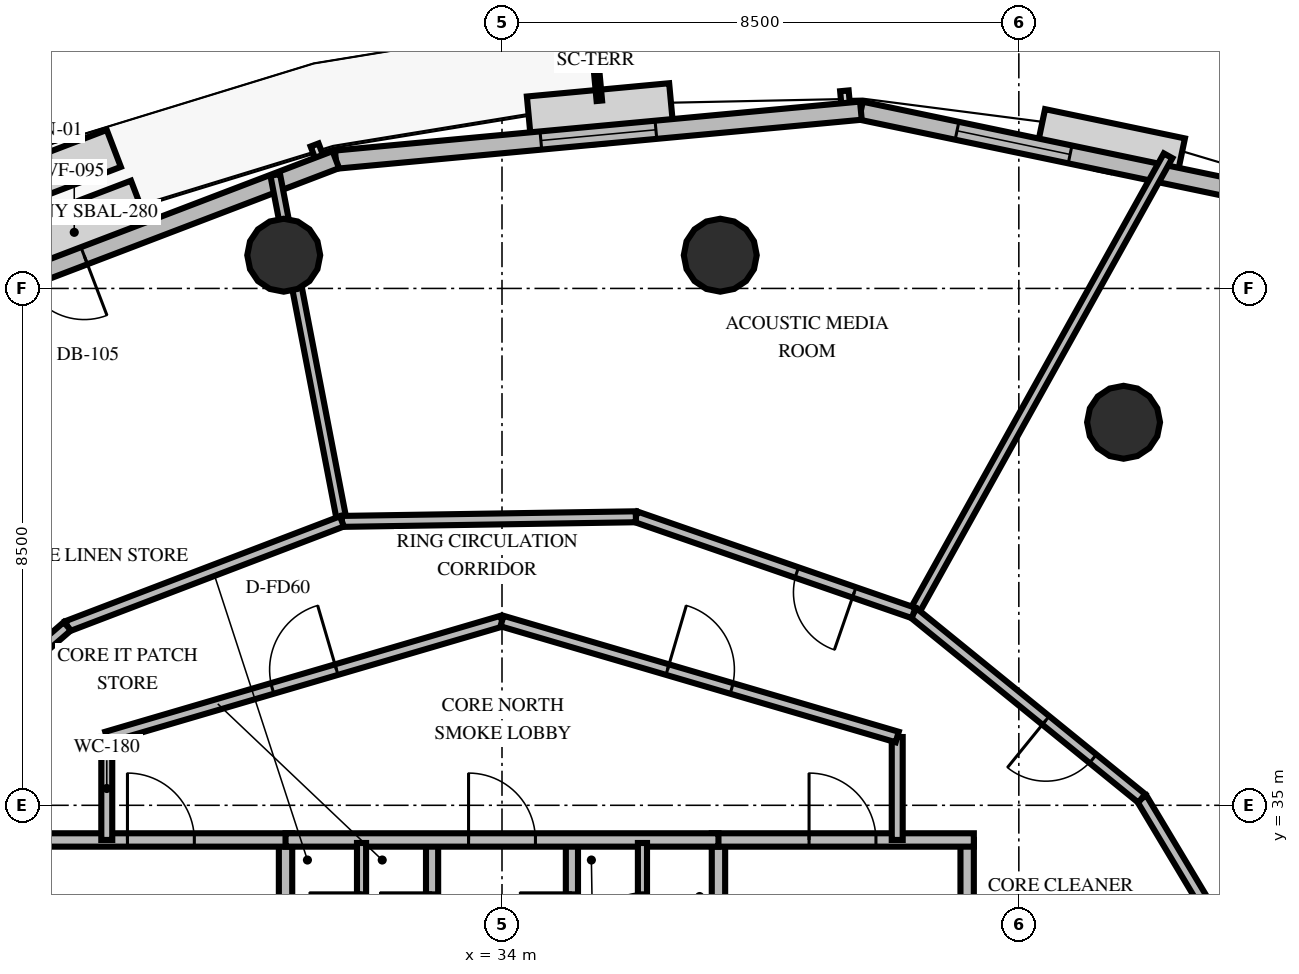
"""IFC4 building model, lengths in metres.
Left out: names, types, materials, properties, quantities, classifications, styles, units other than length and angle.
Written with IfcOpenShell. Run it as: python <this file> out.ifc"""

import sys

from ifc_helpers import new_model, si_unit, direction, frame, frame_2d, origin, origin_2d, place, context, subcontext, project, spatial, rectangle, circle, extrude, element, fill, save


model = new_model("IFC4")
c1 = context("Model", 3, precision=1e-05, world=origin(), true_north=direction((0.0, 1.0)))
c2 = subcontext(c1, "Body", "Model", "MODEL_VIEW")
j1 = project(units=[si_unit("LENGTHUNIT", "METRE"), si_unit("PLANEANGLEUNIT", "RADIAN")], contexts=[c1])
p1 = place(None, origin())
s1 = spatial("IfcSite", under=j1, at=p1, CompositionType="ELEMENT")
p2 = place(p1, origin())
s2 = spatial("IfcBuilding", under=s1, at=p2, CompositionType="ELEMENT")
p3 = place(p2, frame((0.0, 0.0, 121.8)))
s3 = spatial("IfcBuildingStorey", under=s2, at=p3, CompositionType="ELEMENT", Elevation=121.8)
for number, where, z_axis, x_axis in (
    (1, (44.222, 41.299, 0.0), (0.0, 0.0, 1.0), (1.0, 0.0, 0.0)),
    (2, (37.59, 44.046, 0.0), (0.0, 0.0, 1.0), (1.0, 0.0, 0.0)),
    (3, (30.41, 44.046, 0.0), (0.0, 0.0, 1.0), (1.0, 0.0, 0.0)),
):
    element("IfcColumn", number, at=place(p3, frame(where, z_axis=z_axis, x_axis=x_axis)), inside=s3, PredefinedType="COLUMN", context=c2, shape_type="SweptSolid", body=[
        extrude(circle(Radius=0.6, at=origin_2d()), origin(), (0.0, 0.0, 1.0), 4.0),
    ])
p4 = place(p3, frame((47.826, 44.766, 0.0), z_axis=(0.0, 0.0, 1.0), x_axis=(-0.978800890802, 0.20481410148, 0.0)))
e4 = element("IfcWall", 4, at=p4, inside=s3, PredefinedType="SOLIDWALL", context=c2, shape_type="SweptSolid", body=[
    extrude(rectangle(XDim=8.095, YDim=0.3, at=frame_2d((4.047, 0.0))), origin(), (0.0, 0.0, 1.0), 2.9),
])
p5 = place(p4, frame((4.58, 0.0, 0.8)))
e5 = element("IfcOpeningElement", 5, at=p5, cuts=e4, PredefinedType="OPENING", context=c2, shape_type="SweptSolid", body=[
    extrude(rectangle(XDim=1.9, YDim=1.95, at=frame_2d((0.95, 0.975))), frame((0.0, 0.16, 0.0), z_axis=(0.0, -1.0, 0.0), x_axis=(1.0, 0.0, 0.0)), (0.0, 0.0, 1.0), 0.32),
])
p6 = place(p3, frame((39.903, 46.424, 0.0), z_axis=(0.0, 0.0, 1.0), x_axis=(-0.995678666902, -0.092865452549, 0.0)))
e6 = element("IfcWall", 6, at=p6, inside=s3, PredefinedType="SOLIDWALL", context=c2, shape_type="SweptSolid", body=[
    extrude(rectangle(XDim=8.673, YDim=0.3, at=frame_2d((4.336, 0.0))), origin(), (0.0, 0.0, 1.0), 2.9),
])
p7 = place(p6, frame((3.386, 0.0, 0.8)))
e7 = element("IfcOpeningElement", 7, at=p7, cuts=e6, PredefinedType="OPENING", context=c2, shape_type="SweptSolid", body=[
    extrude(rectangle(XDim=1.9, YDim=1.95, at=frame_2d((0.95, 0.975))), frame((0.0, 0.16, 0.0), z_axis=(0.0, -1.0, 0.0), x_axis=(1.0, 0.0, 0.0)), (0.0, 0.0, 1.0), 0.32),
])
p8 = place(p3, frame((31.267, 45.618, 0.0), z_axis=(0.0, 0.0, 1.0), x_axis=(-0.934198586352, -0.356753418003, 0.0)))
e8 = element("IfcWall", 8, at=p8, inside=s3, PredefinedType="SOLIDWALL", context=c2, shape_type="SweptSolid", body=[
    extrude(rectangle(XDim=8.891, YDim=0.3, at=frame_2d((4.445, 0.0))), origin(), (0.0, 0.0, 1.0), 2.9),
])
p9 = place(p8, frame((4.43, 0.0, 0.0)))
e9 = element("IfcOpeningElement", 9, at=p9, cuts=e8, PredefinedType="OPENING", context=c2, shape_type="SweptSolid", body=[
    extrude(rectangle(XDim=1.05, YDim=2.15, at=frame_2d((0.525, 1.075))), frame((0.0, 0.16, 0.0), z_axis=(0.0, -1.0, 0.0), x_axis=(1.0, 0.0, 0.0)), (0.0, 0.0, 1.0), 0.32),
])
p10 = place(p3, frame((30.44, 30.05, 0.0), z_axis=(0.0, 0.0, 1.0), x_axis=(0.0, 1.0, 0.0)))
e10 = element("IfcWall", 10, at=p10, inside=s3, PredefinedType="SOLIDWALL", context=c2, shape_type="SweptSolid", body=[
    extrude(rectangle(XDim=4.38, YDim=0.22, at=frame_2d((2.19, 0.0))), origin(), (0.0, 0.0, 1.0), 2.8),
])
p11 = place(p10, frame((0.8, 0.0, 0.0)))
e11 = element("IfcOpeningElement", 11, at=p11, cuts=e10, PredefinedType="OPENING", context=c2, shape_type="SweptSolid", body=[
    extrude(rectangle(XDim=1.05, YDim=2.1, at=frame_2d((0.525, 1.05))), frame((0.0, 0.12, 0.0), z_axis=(0.0, -1.0, 0.0), x_axis=(1.0, 0.0, 0.0)), (0.0, 0.0, 1.0), 0.24),
])
p12 = place(p3, frame((26.24, 34.43, 0.0), z_axis=(0.0, 0.0, 1.0), x_axis=(1.0, 0.0, 0.0)))
e12 = element("IfcWall", 12, at=p12, inside=s3, PredefinedType="SOLIDWALL", context=c2, shape_type="SweptSolid", body=[
    extrude(rectangle(XDim=4.31, YDim=0.22, at=frame_2d((2.155, 0.0))), origin(), (0.0, 0.0, 1.0), 2.8),
])
p13 = place(p12, frame((1.6, 0.0, 0.0)))
e13 = element("IfcOpeningElement", 13, at=p13, cuts=e12, PredefinedType="OPENING", context=c2, shape_type="SweptSolid", body=[
    extrude(rectangle(XDim=1.1, YDim=2.15, at=frame_2d((0.55, 1.075))), frame((0.0, 0.12, 0.0), z_axis=(0.0, -1.0, 0.0), x_axis=(1.0, 0.0, 0.0)), (0.0, 0.0, 1.0), 0.24),
])
p14 = place(p3, frame((32.85, 30.05, 0.0), z_axis=(0.0, 0.0, 1.0), x_axis=(0.0, 1.0, 0.0)))
e14 = element("IfcWall", 14, at=p14, inside=s3, PredefinedType="SOLIDWALL", context=c2, shape_type="SweptSolid", body=[
    extrude(rectangle(XDim=4.38, YDim=0.2, at=frame_2d((2.19, 0.0))), origin(), (0.0, 0.0, 1.0), 2.8),
])
p15 = place(p14, frame((2.65, 0.0, 0.0)))
e15 = element("IfcOpeningElement", 15, at=p15, cuts=e14, PredefinedType="OPENING", context=c2, shape_type="SweptSolid", body=[
    extrude(rectangle(XDim=0.86, YDim=2.05, at=frame_2d((0.43, 1.025))), frame((0.0, 0.11, 0.0), z_axis=(0.0, -1.0, 0.0), x_axis=(1.0, 0.0, 0.0)), (0.0, 0.0, 1.0), 0.22),
])
p16 = place(p3, frame((37.56, 30.05, 0.0), z_axis=(0.0, 0.0, 1.0), x_axis=(0.0, 1.0, 0.0)))
e16 = element("IfcWall", 16, at=p16, inside=s3, PredefinedType="SOLIDWALL", context=c2, shape_type="SweptSolid", body=[
    extrude(rectangle(XDim=4.38, YDim=0.22, at=frame_2d((2.19, 0.0))), origin(), (0.0, 0.0, 1.0), 2.8),
])
p17 = place(p16, frame((0.8, 0.0, 0.0)))
e17 = element("IfcOpeningElement", 17, at=p17, cuts=e16, PredefinedType="OPENING", context=c2, shape_type="SweptSolid", body=[
    extrude(rectangle(XDim=1.05, YDim=2.1, at=frame_2d((0.525, 1.05))), frame((0.0, 0.12, 0.0), z_axis=(0.0, -1.0, 0.0), x_axis=(1.0, 0.0, 0.0)), (0.0, 0.0, 1.0), 0.24),
])
p18 = place(p3, frame((41.65, 30.05, 0.0), z_axis=(0.0, 0.0, 1.0), x_axis=(0.0, 1.0, 0.0)))
e18 = element("IfcWall", 18, at=p18, inside=s3, PredefinedType="SOLIDWALL", context=c2, shape_type="SweptSolid", body=[
    extrude(rectangle(XDim=4.38, YDim=0.22, at=frame_2d((2.19, 0.0))), origin(), (0.0, 0.0, 1.0), 2.8),
])
p19 = place(p3, frame((37.45, 34.43, 0.0), z_axis=(0.0, 0.0, 1.0), x_axis=(1.0, 0.0, 0.0)))
e19 = element("IfcWall", 19, at=p19, inside=s3, PredefinedType="SOLIDWALL", context=c2, shape_type="SweptSolid", body=[
    extrude(rectangle(XDim=4.31, YDim=0.22, at=frame_2d((2.155, 0.0))), origin(), (0.0, 0.0, 1.0), 2.8),
])
p20 = place(p19, frame((1.6, 0.0, 0.0)))
e20 = element("IfcOpeningElement", 20, at=p20, cuts=e19, PredefinedType="OPENING", context=c2, shape_type="SweptSolid", body=[
    extrude(rectangle(XDim=1.1, YDim=2.15, at=frame_2d((0.55, 1.075))), frame((0.0, 0.12, 0.0), z_axis=(0.0, -1.0, 0.0), x_axis=(1.0, 0.0, 0.0)), (0.0, 0.0, 1.0), 0.24),
])
p21 = place(p3, frame((35.15, 30.05, 0.0), z_axis=(0.0, 0.0, 1.0), x_axis=(0.0, 1.0, 0.0)))
e21 = element("IfcWall", 21, at=p21, inside=s3, PredefinedType="SOLIDWALL", context=c2, shape_type="SweptSolid", body=[
    extrude(rectangle(XDim=4.38, YDim=0.2, at=frame_2d((2.19, 0.0))), origin(), (0.0, 0.0, 1.0), 2.8),
])
p22 = place(p21, frame((2.65, 0.0, 0.0)))
e22 = element("IfcOpeningElement", 22, at=p22, cuts=e21, PredefinedType="OPENING", context=c2, shape_type="SweptSolid", body=[
    extrude(rectangle(XDim=0.86, YDim=2.05, at=frame_2d((0.43, 1.025))), frame((0.0, 0.11, 0.0), z_axis=(0.0, -1.0, 0.0), x_axis=(1.0, 0.0, 0.0)), (0.0, 0.0, 1.0), 0.22),
])
p23 = place(p3, frame((30.44, 34.43, 0.0), z_axis=(0.0, 0.0, 1.0), x_axis=(1.0, 0.0, 0.0)))
e23 = element("IfcWall", 23, at=p23, inside=s3, PredefinedType="SOLIDWALL", context=c2, shape_type="SweptSolid", body=[
    extrude(rectangle(XDim=7.12, YDim=0.22, at=frame_2d((3.56, 0.0))), origin(), (0.0, 0.0, 1.0), 2.8),
])
p24 = place(p23, frame((3.01, 0.0, 0.0)))
e24 = element("IfcOpeningElement", 24, at=p24, cuts=e23, PredefinedType="OPENING", context=c2, shape_type="SweptSolid", body=[
    extrude(rectangle(XDim=1.1, YDim=2.15, at=frame_2d((0.55, 1.075))), frame((0.0, 0.12, 0.0), z_axis=(0.0, -1.0, 0.0), x_axis=(1.0, 0.0, 0.0)), (0.0, 0.0, 1.0), 0.24),
])
p25 = place(p3, frame((31.69, 32.05, 0.0), z_axis=(0.0, 0.0, 1.0), x_axis=(0.0, 1.0, 0.0)))
e25 = element("IfcWall", 25, at=p25, inside=s3, PredefinedType="PARTITIONING", context=c2, shape_type="SweptSolid", body=[
    extrude(rectangle(XDim=2.33, YDim=0.15, at=frame_2d((1.165, 0.0))), origin(), (0.0, 0.0, 1.0), 2.8),
])
p26 = place(p25, frame((0.65, 0.0, 0.0)))
e26 = element("IfcOpeningElement", 26, at=p26, cuts=e25, PredefinedType="OPENING", context=c2, shape_type="SweptSolid", body=[
    extrude(rectangle(XDim=0.86, YDim=2.05, at=frame_2d((0.43, 1.025))), frame((0.0, 0.085, 0.0), z_axis=(0.0, -1.0, 0.0), x_axis=(1.0, 0.0, 0.0)), (0.0, 0.0, 1.0), 0.17),
])
p27 = place(p3, frame((36.31, 32.05, 0.0), z_axis=(0.0, 0.0, 1.0), x_axis=(0.0, 1.0, 0.0)))
e27 = element("IfcWall", 27, at=p27, inside=s3, PredefinedType="PARTITIONING", context=c2, shape_type="SweptSolid", body=[
    extrude(rectangle(XDim=2.33, YDim=0.15, at=frame_2d((1.165, 0.0))), origin(), (0.0, 0.0, 1.0), 2.8),
])
p28 = place(p27, frame((0.65, 0.0, 0.0)))
e28 = element("IfcOpeningElement", 28, at=p28, cuts=e27, PredefinedType="OPENING", context=c2, shape_type="SweptSolid", body=[
    extrude(rectangle(XDim=0.86, YDim=2.05, at=frame_2d((0.43, 1.025))), frame((0.0, 0.085, 0.0), z_axis=(0.0, -1.0, 0.0), x_axis=(1.0, 0.0, 0.0)), (0.0, 0.0, 1.0), 0.17),
])
for number, where, z_axis, x_axis in (
    (29, (27.5, 34.43, 0.0), (0.0, 0.0, 1.0), (0.0, 1.0, 0.0)),
    (30, (40.5, 36.123, 0.0), (0.0, 0.0, 1.0), (0.0, -1.0, 0.0)),
):
    element("IfcWall", number, at=place(p3, frame(where, z_axis=z_axis, x_axis=x_axis)), inside=s3, PredefinedType="PARTITIONING", context=c2, shape_type="SweptSolid", body=[
        extrude(rectangle(XDim=1.693, YDim=0.18, at=frame_2d((0.846, 0.0))), origin(), (0.0, 0.0, 1.0), 2.8),
    ])
p29 = place(p3, frame((27.5, 36.123, 0.0), z_axis=(0.0, 0.0, 1.0), x_axis=(0.959546654541, 0.281549671923, 0.0)))
e31 = element("IfcWall", 31, at=p29, inside=s3, PredefinedType="PARTITIONING", context=c2, shape_type="SweptSolid", body=[
    extrude(rectangle(XDim=6.774, YDim=0.18, at=frame_2d((3.387, 0.0))), origin(), (0.0, 0.0, 1.0), 2.8),
])
p30 = place(p29, frame((2.837, 0.0, 0.0)))
e32 = element("IfcOpeningElement", 32, at=p30, cuts=e31, PredefinedType="OPENING", context=c2, shape_type="SweptSolid", body=[
    extrude(rectangle(XDim=1.1, YDim=2.15, at=frame_2d((0.55, 1.075))), frame((0.0, 0.1, 0.0), z_axis=(0.0, -1.0, 0.0), x_axis=(1.0, 0.0, 0.0)), (0.0, 0.0, 1.0), 0.2),
])
p31 = place(p3, frame((34.0, 38.03, 0.0), z_axis=(0.0, 0.0, 1.0), x_axis=(0.959546654541, -0.281549671923, 0.0)))
e33 = element("IfcWall", 33, at=p31, inside=s3, PredefinedType="PARTITIONING", context=c2, shape_type="SweptSolid", body=[
    extrude(rectangle(XDim=6.774, YDim=0.18, at=frame_2d((3.387, 0.0))), origin(), (0.0, 0.0, 1.0), 2.8),
])
p32 = place(p31, frame((2.837, 0.0, 0.0)))
e34 = element("IfcOpeningElement", 34, at=p32, cuts=e33, PredefinedType="OPENING", context=c2, shape_type="SweptSolid", body=[
    extrude(rectangle(XDim=1.1, YDim=2.15, at=frame_2d((0.55, 1.075))), frame((0.0, 0.1, 0.0), z_axis=(0.0, -1.0, 0.0), x_axis=(1.0, 0.0, 0.0)), (0.0, 0.0, 1.0), 0.2),
])
p33 = place(p3, frame((40.77, 38.163, 0.0), z_axis=(0.0, 0.0, 1.0), x_axis=(0.486326925852, 0.873776928736, 0.0)))
e35 = element("IfcWall", 35, at=p33, inside=s3, PredefinedType="PARTITIONING", context=c2, shape_type="SweptSolid", body=[
    extrude(rectangle(XDim=8.605, YDim=0.16, at=frame_2d((4.302, 0.0))), origin(), (0.0, 0.0, 1.0), 2.8),
])
p34 = place(p3, frame((47.004, 30.966, 0.0), z_axis=(0.0, 0.0, 1.0), x_axis=(-0.513544831917, 0.858062763212, 0.0)))
e36 = element("IfcWall", 36, at=p34, inside=s3, PredefinedType="PARTITIONING", context=c2, shape_type="SweptSolid", body=[
    extrude(rectangle(XDim=4.834, YDim=0.18, at=frame_2d((2.417, 0.0))), origin(), (0.0, 0.0, 1.0), 2.8),
])
p35 = place(p3, frame((44.521, 35.114, 0.0), z_axis=(0.0, 0.0, 1.0), x_axis=(-0.776056841092, 0.630662968149, 0.0)))
e37 = element("IfcWall", 37, at=p35, inside=s3, PredefinedType="PARTITIONING", context=c2, shape_type="SweptSolid", body=[
    extrude(rectangle(XDim=4.834, YDim=0.18, at=frame_2d((2.417, 0.0))), origin(), (0.0, 0.0, 1.0), 2.8),
])
p36 = place(p35, frame((1.034, 0.0, 0.0)))
e38 = element("IfcOpeningElement", 38, at=p36, cuts=e37, PredefinedType="OPENING", context=c2, shape_type="SweptSolid", body=[
    extrude(rectangle(XDim=1.0, YDim=2.15, at=frame_2d((0.5, 1.075))), frame((0.0, 0.1, 0.0), z_axis=(0.0, -1.0, 0.0), x_axis=(1.0, 0.0, 0.0)), (0.0, 0.0, 1.0), 0.2),
])
p37 = place(p3, frame((31.368, 39.669, 0.0), z_axis=(0.0, 0.0, 1.0), x_axis=(-0.18909703684, 0.981958405768, 0.0)))
e39 = element("IfcWall", 39, at=p37, inside=s3, PredefinedType="PARTITIONING", context=c2, shape_type="SweptSolid", body=[
    extrude(rectangle(XDim=5.803, YDim=0.16, at=frame_2d((2.902, 0.0))), origin(), (0.0, 0.0, 1.0), 2.8),
])
p38 = place(p3, frame((40.77, 38.163, 0.0), z_axis=(0.0, 0.0, 1.0), x_axis=(-0.944937429252, 0.32725105775, 0.0)))
e40 = element("IfcWall", 40, at=p38, inside=s3, PredefinedType="PARTITIONING", context=c2, shape_type="SweptSolid", body=[
    extrude(rectangle(XDim=4.834, YDim=0.18, at=frame_2d((2.417, 0.0))), origin(), (0.0, 0.0, 1.0), 2.8),
])
p39 = place(p38, frame((1.034, 0.0, 0.0)))
e41 = element("IfcOpeningElement", 41, at=p39, cuts=e40, PredefinedType="OPENING", context=c2, shape_type="SweptSolid", body=[
    extrude(rectangle(XDim=1.0, YDim=2.15, at=frame_2d((0.5, 1.075))), frame((0.0, 0.1, 0.0), z_axis=(0.0, -1.0, 0.0), x_axis=(1.0, 0.0, 0.0)), (0.0, 0.0, 1.0), 0.2),
])
p40 = place(p3, frame((36.202, 39.745, 0.0), z_axis=(0.0, 0.0, 1.0), x_axis=(-0.999876654329, -0.015705926537, 0.0)))
e42 = element("IfcWall", 42, at=p40, inside=s3, PredefinedType="PARTITIONING", context=c2, shape_type="SweptSolid", body=[
    extrude(rectangle(XDim=4.834, YDim=0.18, at=frame_2d((2.417, 0.0))), origin(), (0.0, 0.0, 1.0), 2.8),
])
p41 = place(p3, frame((31.368, 39.669, 0.0), z_axis=(0.0, 0.0, 1.0), x_axis=(-0.934205840652, -0.356734421232, 0.0)))
e43 = element("IfcWall", 43, at=p41, inside=s3, PredefinedType="PARTITIONING", context=c2, shape_type="SweptSolid", body=[
    extrude(rectangle(XDim=4.834, YDim=0.18, at=frame_2d((2.417, 0.0))), origin(), (0.0, 0.0, 1.0), 2.8),
])
p42 = place(p3, frame((26.852, 37.944, 0.0), z_axis=(0.0, 0.0, 1.0), x_axis=(-0.755849022926, -0.654745946564, 0.0)))
e44 = element("IfcWall", 44, at=p42, inside=s3, PredefinedType="PARTITIONING", context=c2, shape_type="SweptSolid", body=[
    extrude(rectangle(XDim=4.834, YDim=0.18, at=frame_2d((2.417, 0.0))), origin(), (0.0, 0.0, 1.0), 2.8),
])
p43 = place(p42, frame((2.801, 0.0, 0.0)))
e45 = element("IfcOpeningElement", 45, at=p43, cuts=e44, PredefinedType="OPENING", context=c2, shape_type="SweptSolid", body=[
    extrude(rectangle(XDim=1.0, YDim=2.15, at=frame_2d((0.5, 1.075))), frame((0.0, 0.1, 0.0), z_axis=(0.0, -1.0, 0.0), x_axis=(1.0, 0.0, 0.0)), (0.0, 0.0, 1.0), 0.2),
])
p44 = place(p5, origin())
e46 = element("IfcWindow", 46, at=p44, inside=s3, PartitioningType="SINGLE_PANEL", PredefinedType="WINDOW", context=c2, shape_type="SweptSolid", body=[
    extrude(rectangle(XDim=1.9, YDim=1.95, at=frame_2d((0.95, 0.975))), frame((0.0, 0.03, 0.0), z_axis=(0.0, -1.0, 0.0), x_axis=(1.0, 0.0, 0.0)), (0.0, 0.0, 1.0), 0.06),
])
fill(e5, e46)
p45 = place(p7, origin())
e47 = element("IfcWindow", 47, at=p45, inside=s3, PartitioningType="SINGLE_PANEL", PredefinedType="WINDOW", context=c2, shape_type="SweptSolid", body=[
    extrude(rectangle(XDim=1.9, YDim=1.95, at=frame_2d((0.95, 0.975))), frame((0.0, 0.03, 0.0), z_axis=(0.0, -1.0, 0.0), x_axis=(1.0, 0.0, 0.0)), (0.0, 0.0, 1.0), 0.06),
])
fill(e7, e47)
p46 = place(p9, origin())
e48 = element("IfcDoor", 48, at=p46, inside=s3, OperationType="SINGLE_SWING_LEFT", PredefinedType="DOOR", context=c2, shape_type="SweptSolid", body=[
    extrude(rectangle(XDim=1.05, YDim=2.15, at=frame_2d((0.525, 1.075))), frame((0.0, 0.025, 0.0), z_axis=(0.0, -1.0, 0.0), x_axis=(1.0, 0.0, 0.0)), (0.0, 0.0, 1.0), 0.05),
])
fill(e9, e48)
p47 = place(p13, origin())
e49 = element("IfcDoor", 49, at=p47, inside=s3, OperationType="SINGLE_SWING_LEFT", PredefinedType="DOOR", context=c2, shape_type="SweptSolid", body=[
    extrude(rectangle(XDim=1.1, YDim=2.15, at=frame_2d((0.55, 1.075))), frame((0.0, 0.025, 0.0), z_axis=(0.0, -1.0, 0.0), x_axis=(1.0, 0.0, 0.0)), (0.0, 0.0, 1.0), 0.05),
])
fill(e13, e49)
p48 = place(p15, origin())
e50 = element("IfcDoor", 50, at=p48, inside=s3, OperationType="SINGLE_SWING_RIGHT", PredefinedType="TRAPDOOR", context=c2, shape_type="SweptSolid", body=[
    extrude(rectangle(XDim=0.86, YDim=2.05, at=frame_2d((0.43, 1.025))), frame((0.0, 0.025, 0.0), z_axis=(0.0, -1.0, 0.0), x_axis=(1.0, 0.0, 0.0)), (0.0, 0.0, 1.0), 0.05),
])
fill(e15, e50)
p49 = place(p20, origin())
e51 = element("IfcDoor", 51, at=p49, inside=s3, OperationType="SINGLE_SWING_LEFT", PredefinedType="DOOR", context=c2, shape_type="SweptSolid", body=[
    extrude(rectangle(XDim=1.1, YDim=2.15, at=frame_2d((0.55, 1.075))), frame((0.0, 0.025, 0.0), z_axis=(0.0, -1.0, 0.0), x_axis=(1.0, 0.0, 0.0)), (0.0, 0.0, 1.0), 0.05),
])
fill(e20, e51)
p50 = place(p22, origin())
e52 = element("IfcDoor", 52, at=p50, inside=s3, OperationType="SINGLE_SWING_RIGHT", PredefinedType="TRAPDOOR", context=c2, shape_type="SweptSolid", body=[
    extrude(rectangle(XDim=0.86, YDim=2.05, at=frame_2d((0.43, 1.025))), frame((0.0, 0.025, 0.0), z_axis=(0.0, -1.0, 0.0), x_axis=(1.0, 0.0, 0.0)), (0.0, 0.0, 1.0), 0.05),
])
fill(e22, e52)
p51 = place(p24, origin())
e53 = element("IfcDoor", 53, at=p51, inside=s3, OperationType="SINGLE_SWING_LEFT", PredefinedType="DOOR", context=c2, shape_type="SweptSolid", body=[
    extrude(rectangle(XDim=1.1, YDim=2.15, at=frame_2d((0.55, 1.075))), frame((0.0, 0.025, 0.0), z_axis=(0.0, -1.0, 0.0), x_axis=(1.0, 0.0, 0.0)), (0.0, 0.0, 1.0), 0.05),
])
fill(e24, e53)
p52 = place(p26, origin())
e54 = element("IfcDoor", 54, at=p52, inside=s3, OperationType="SINGLE_SWING_RIGHT", PredefinedType="TRAPDOOR", context=c2, shape_type="SweptSolid", body=[
    extrude(rectangle(XDim=0.86, YDim=2.05, at=frame_2d((0.43, 1.025))), frame((0.0, 0.025, 0.0), z_axis=(0.0, -1.0, 0.0), x_axis=(1.0, 0.0, 0.0)), (0.0, 0.0, 1.0), 0.05),
])
fill(e26, e54)
p53 = place(p28, origin())
e55 = element("IfcDoor", 55, at=p53, inside=s3, OperationType="SINGLE_SWING_LEFT", PredefinedType="TRAPDOOR", context=c2, shape_type="SweptSolid", body=[
    extrude(rectangle(XDim=0.86, YDim=2.05, at=frame_2d((0.43, 1.025))), frame((0.0, 0.025, 0.0), z_axis=(0.0, -1.0, 0.0), x_axis=(1.0, 0.0, 0.0)), (0.0, 0.0, 1.0), 0.05),
])
fill(e28, e55)
p54 = place(p30, origin())
e56 = element("IfcDoor", 56, at=p54, inside=s3, OperationType="SINGLE_SWING_RIGHT", PredefinedType="DOOR", context=c2, shape_type="SweptSolid", body=[
    extrude(rectangle(XDim=1.1, YDim=2.15, at=frame_2d((0.55, 1.075))), frame((0.0, 0.025, 0.0), z_axis=(0.0, -1.0, 0.0), x_axis=(1.0, 0.0, 0.0)), (0.0, 0.0, 1.0), 0.05),
])
fill(e32, e56)
p55 = place(p32, origin())
e57 = element("IfcDoor", 57, at=p55, inside=s3, OperationType="SINGLE_SWING_LEFT", PredefinedType="DOOR", context=c2, shape_type="SweptSolid", body=[
    extrude(rectangle(XDim=1.1, YDim=2.15, at=frame_2d((0.55, 1.075))), frame((0.0, 0.025, 0.0), z_axis=(0.0, -1.0, 0.0), x_axis=(1.0, 0.0, 0.0)), (0.0, 0.0, 1.0), 0.05),
])
fill(e34, e57)
p56 = place(p36, origin())
e58 = element("IfcDoor", 58, at=p56, inside=s3, OperationType="SINGLE_SWING_RIGHT", PredefinedType="DOOR", context=c2, shape_type="SweptSolid", body=[
    extrude(rectangle(XDim=1.0, YDim=2.15, at=frame_2d((0.5, 1.075))), frame((0.0, 0.025, 0.0), z_axis=(0.0, -1.0, 0.0), x_axis=(1.0, 0.0, 0.0)), (0.0, 0.0, 1.0), 0.05),
])
fill(e38, e58)
p57 = place(p39, origin())
e59 = element("IfcDoor", 59, at=p57, inside=s3, OperationType="SINGLE_SWING_LEFT", PredefinedType="DOOR", context=c2, shape_type="SweptSolid", body=[
    extrude(rectangle(XDim=1.0, YDim=2.15, at=frame_2d((0.5, 1.075))), frame((0.0, 0.025, 0.0), z_axis=(0.0, -1.0, 0.0), x_axis=(1.0, 0.0, 0.0)), (0.0, 0.0, 1.0), 0.05),
])
fill(e41, e59)
save(model, sys.argv[1])
